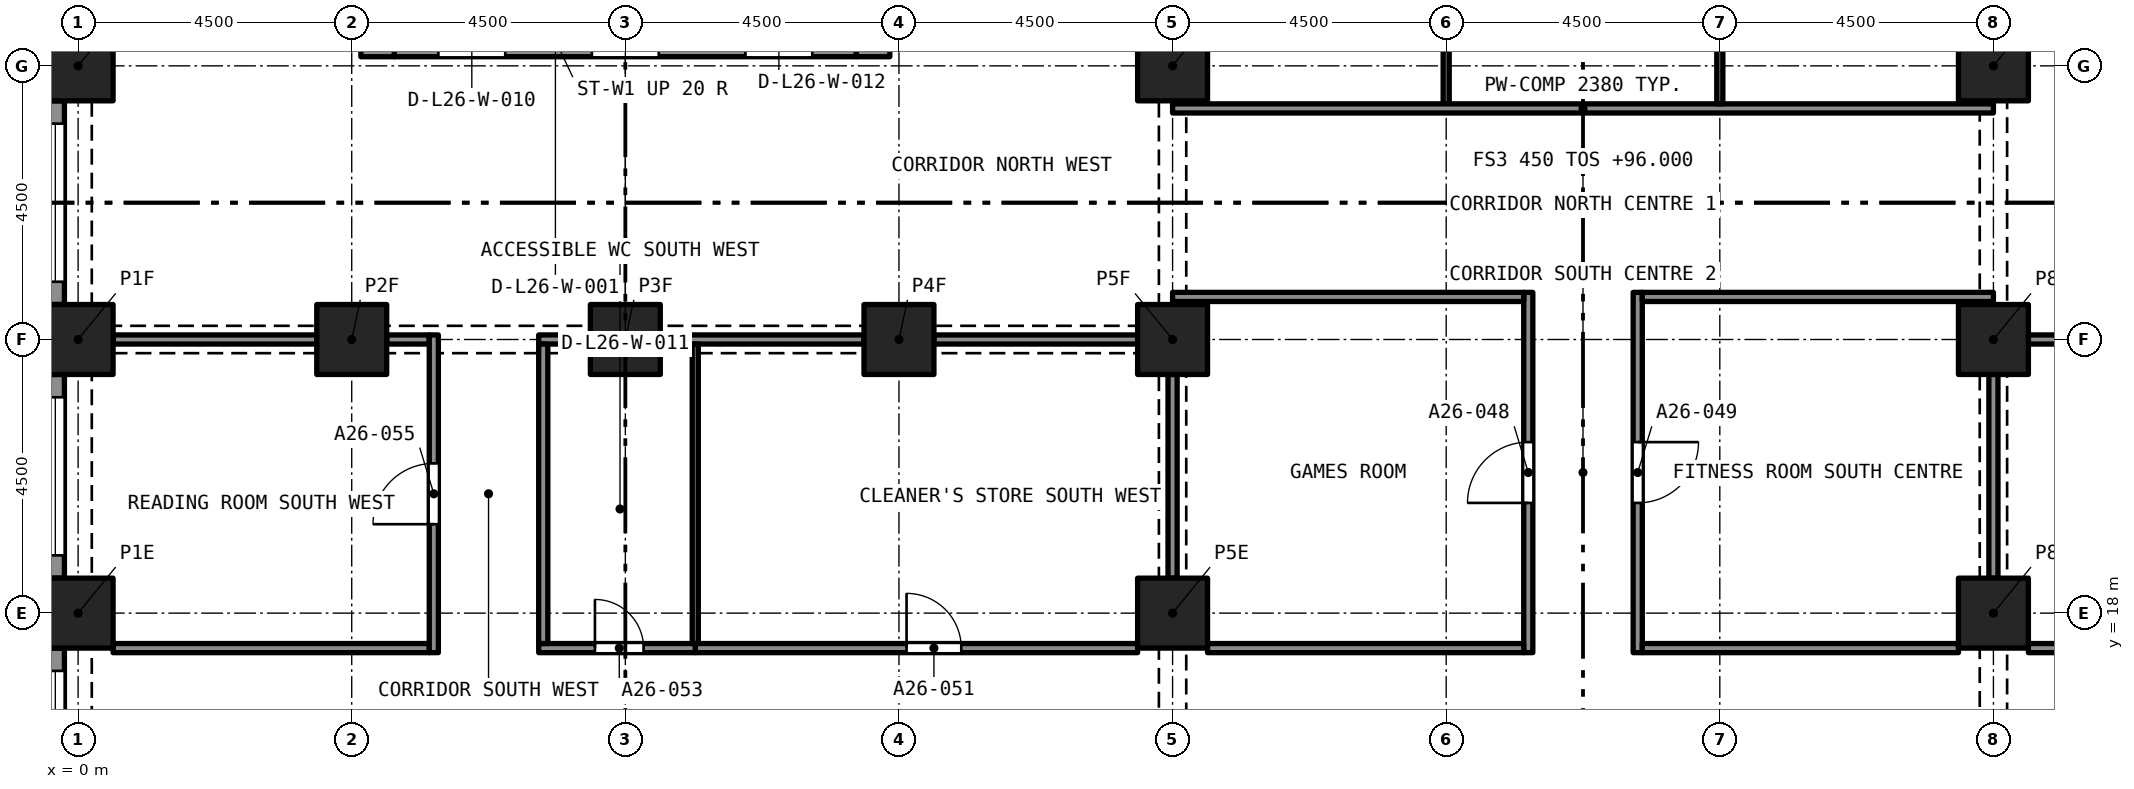
"""IFC4 building model, lengths in metres.
Left out: names, types, materials, properties, quantities, classifications, styles, units other than length and angle.
Written with IfcOpenShell. Run it as: python <this file> out.ifc"""

import sys

from ifc_helpers import new_model, si_unit, direction, frame, frame_2d, origin, origin_2d, place, context, subcontext, project, spatial, rectangle, extrude, element, fill, save


model = new_model("IFC4")
c1 = context("Model", 3, precision=1e-05, world=origin(), true_north=direction((0.0, 1.0)))
c2 = subcontext(c1, "Body", "Model", "MODEL_VIEW")
j1 = project(units=[si_unit("LENGTHUNIT", "METRE"), si_unit("PLANEANGLEUNIT", "RADIAN")], contexts=[c1])
p1 = place(None, origin())
s1 = spatial("IfcSite", under=j1, at=p1, CompositionType="ELEMENT")
p2 = place(p1, origin())
s2 = spatial("IfcBuilding", under=s1, at=p2, CompositionType="ELEMENT")
p3 = place(p2, frame((0.0, 0.0, 96.0)))
s3 = spatial("IfcBuildingStorey", under=s2, at=p3, CompositionType="ELEMENT", Elevation=96.0)
for number, where, z_axis, x_axis in (
    (1, (0.0, 18.0, 0.0), (0.0, 0.0, 1.0), (1.0, 0.0, 0.0)),
    (2, (18.0, 18.0, 0.0), (0.0, 0.0, 1.0), (1.0, 0.0, 0.0)),
    (3, (31.5, 18.0, 0.0), (0.0, 0.0, 1.0), (1.0, 0.0, 0.0)),
    (4, (0.0, 22.5, 0.0), (0.0, 0.0, 1.0), (1.0, 0.0, 0.0)),
    (5, (4.5, 22.5, 0.0), (0.0, 0.0, 1.0), (1.0, 0.0, 0.0)),
    (6, (9.0, 22.5, 0.0), (0.0, 0.0, 1.0), (1.0, 0.0, 0.0)),
    (7, (13.5, 22.5, 0.0), (0.0, 0.0, 1.0), (1.0, 0.0, 0.0)),
    (8, (18.0, 22.5, 0.0), (0.0, 0.0, 1.0), (1.0, 0.0, 0.0)),
    (9, (31.5, 22.5, 0.0), (0.0, 0.0, 1.0), (1.0, 0.0, 0.0)),
    (10, (0.0, 27.0, 0.0), (0.0, 0.0, 1.0), (1.0, 0.0, 0.0)),
    (11, (18.0, 27.0, 0.0), (0.0, 0.0, 1.0), (1.0, 0.0, 0.0)),
    (12, (31.5, 27.0, 0.0), (0.0, 0.0, 1.0), (1.0, 0.0, 0.0)),
):
    element("IfcColumn", number, at=place(p3, frame(where, z_axis=z_axis, x_axis=x_axis)), inside=s3, PredefinedType="COLUMN", context=c2, shape_type="SweptSolid", body=[
        extrude(rectangle(XDim=1.15, YDim=1.15, at=origin_2d()), origin(), (0.0, 0.0, 1.0), 3.2),
    ])
p4 = place(p3, frame((5.2, 27.425, 0.0), z_axis=(0.0, 0.0, 1.0), x_axis=(1.0, 0.0, 0.0)))
e13 = element("IfcWall", 13, at=p4, inside=s3, PredefinedType="SOLIDWALL", context=c2, shape_type="SweptSolid", body=[
    extrude(rectangle(XDim=7.6, YDim=0.55, at=frame_2d((3.8, 0.0))), origin(), (0.0, 0.0, 1.0), 3.2),
])
p5 = place(p4, frame((0.725, 0.0, 0.0)))
e14 = element("IfcOpeningElement", 14, at=p5, cuts=e13, PredefinedType="OPENING", context=c2, shape_type="SweptSolid", body=[
    extrude(rectangle(XDim=1.1, YDim=2.1, at=frame_2d((0.55, 1.05))), frame((0.0, 0.285, 0.0), z_axis=(0.0, -1.0, 0.0), x_axis=(1.0, 0.0, 0.0)), (0.0, 0.0, 1.0), 0.57),
])
p6 = place(p4, frame((3.25, 0.0, 0.0)))
e15 = element("IfcOpeningElement", 15, at=p6, cuts=e13, PredefinedType="OPENING", context=c2, shape_type="SweptSolid", body=[
    extrude(rectangle(XDim=1.1, YDim=2.1, at=frame_2d((0.55, 1.05))), frame((0.0, 0.285, 0.0), z_axis=(0.0, -1.0, 0.0), x_axis=(1.0, 0.0, 0.0)), (0.0, 0.0, 1.0), 0.57),
])
p7 = place(p4, frame((5.775, 0.0, 0.0)))
e16 = element("IfcOpeningElement", 16, at=p7, cuts=e13, PredefinedType="OPENING", context=c2, shape_type="SweptSolid", body=[
    extrude(rectangle(XDim=1.1, YDim=2.1, at=frame_2d((0.55, 1.05))), frame((0.0, 0.285, 0.0), z_axis=(0.0, -1.0, 0.0), x_axis=(1.0, 0.0, 0.0)), (0.0, 0.0, 1.0), 0.57),
])
p8 = place(p3, frame((4.925, 27.15, 0.0), z_axis=(0.0, 0.0, 1.0), x_axis=(0.0, 1.0, 0.0)))
e17 = element("IfcWall", 17, at=p8, inside=s3, PredefinedType="SOLIDWALL", context=c2, shape_type="SweptSolid", body=[
    extrude(rectangle(XDim=13.2, YDim=0.55, at=frame_2d((6.6, 0.0))), origin(), (0.0, 0.0, 1.0), 3.2),
])
p9 = place(p8, frame((8.8, 0.0, 0.0)))
e18 = element("IfcOpeningElement", 18, at=p9, cuts=e17, PredefinedType="OPENING", context=c2, shape_type="SweptSolid", body=[
    extrude(rectangle(XDim=1.2, YDim=2.1, at=frame_2d((0.6, 1.05))), frame((0.0, 0.285, 0.0), z_axis=(0.0, -1.0, 0.0), x_axis=(1.0, 0.0, 0.0)), (0.0, 0.0, 1.0), 0.57),
])
p10 = place(p3, frame((13.075, 27.15, 0.0), z_axis=(0.0, 0.0, 1.0), x_axis=(0.0, 1.0, 0.0)))
e19 = element("IfcWall", 19, at=p10, inside=s3, PredefinedType="SOLIDWALL", context=c2, shape_type="SweptSolid", body=[
    extrude(rectangle(XDim=13.2, YDim=0.55, at=frame_2d((6.6, 0.0))), origin(), (0.0, 0.0, 1.0), 3.2),
])
p11 = place(p10, frame((10.95, 0.0, 0.0)))
e20 = element("IfcOpeningElement", 20, at=p11, cuts=e19, PredefinedType="OPENING", context=c2, shape_type="SweptSolid", body=[
    extrude(rectangle(XDim=1.1, YDim=2.1, at=frame_2d((0.55, 1.05))), frame((0.0, 0.285, 0.0), z_axis=(0.0, -1.0, 0.0), x_axis=(1.0, 0.0, 0.0)), (0.0, 0.0, 1.0), 0.57),
])
p12 = place(p10, frame((8.8, 0.0, 0.0)))
e21 = element("IfcOpeningElement", 21, at=p12, cuts=e19, PredefinedType="OPENING", context=c2, shape_type="SweptSolid", body=[
    extrude(rectangle(XDim=1.2, YDim=2.1, at=frame_2d((0.6, 1.05))), frame((0.0, 0.285, 0.0), z_axis=(0.0, -1.0, 0.0), x_axis=(1.0, 0.0, 0.0)), (0.0, 0.0, 1.0), 0.57),
])
p13 = place(p3, frame((-0.375, 23.075, 0.0), z_axis=(0.0, 0.0, 1.0), x_axis=(0.0, 1.0, 0.0)))
e22 = element("IfcWall", 22, at=p13, inside=s3, PredefinedType="SOLIDWALL", context=c2, shape_type="SweptSolid", body=[
    extrude(rectangle(XDim=3.35, YDim=0.3, at=frame_2d((1.675, 0.0))), origin(), (0.0, 0.0, 1.0), 3.2),
])
p14 = place(p13, frame((0.375, 0.0, 0.45)))
e23 = element("IfcOpeningElement", 23, at=p14, cuts=e22, PredefinedType="OPENING", context=c2, shape_type="SweptSolid", body=[
    extrude(rectangle(XDim=2.6, YDim=1.95, at=frame_2d((1.3, 0.975))), frame((0.0, 0.16, 0.0), z_axis=(0.0, -1.0, 0.0), x_axis=(1.0, 0.0, 0.0)), (0.0, 0.0, 1.0), 0.32),
])
p15 = place(p3, frame((-0.375, 18.575, 0.0), z_axis=(0.0, 0.0, 1.0), x_axis=(0.0, 1.0, 0.0)))
e24 = element("IfcWall", 24, at=p15, inside=s3, PredefinedType="SOLIDWALL", context=c2, shape_type="SweptSolid", body=[
    extrude(rectangle(XDim=3.35, YDim=0.3, at=frame_2d((1.675, 0.0))), origin(), (0.0, 0.0, 1.0), 3.2),
])
p16 = place(p15, frame((0.375, 0.0, 0.45)))
e25 = element("IfcOpeningElement", 25, at=p16, cuts=e24, PredefinedType="OPENING", context=c2, shape_type="SweptSolid", body=[
    extrude(rectangle(XDim=2.6, YDim=1.95, at=frame_2d((1.3, 0.975))), frame((0.0, 0.16, 0.0), z_axis=(0.0, -1.0, 0.0), x_axis=(1.0, 0.0, 0.0)), (0.0, 0.0, 1.0), 0.32),
])
p17 = place(p3, frame((-0.375, 14.075, 0.0), z_axis=(0.0, 0.0, 1.0), x_axis=(0.0, 1.0, 0.0)))
e26 = element("IfcWall", 26, at=p17, inside=s3, PredefinedType="SOLIDWALL", context=c2, shape_type="SweptSolid", body=[
    extrude(rectangle(XDim=3.35, YDim=0.3, at=frame_2d((1.675, 0.0))), origin(), (0.0, 0.0, 1.0), 3.2),
])
p18 = place(p17, frame((0.375, 0.0, 0.45)))
e27 = element("IfcOpeningElement", 27, at=p18, cuts=e26, PredefinedType="OPENING", context=c2, shape_type="SweptSolid", body=[
    extrude(rectangle(XDim=2.6, YDim=1.95, at=frame_2d((1.3, 0.975))), frame((0.0, 0.16, 0.0), z_axis=(0.0, -1.0, 0.0), x_axis=(1.0, 0.0, 0.0)), (0.0, 0.0, 1.0), 0.32),
])
p19 = place(p3, frame((23.85, 17.35, 0.0), z_axis=(0.0, 0.0, 1.0), x_axis=(0.0, 1.0, 0.0)))
e28 = element("IfcWall", 28, at=p19, inside=s3, PredefinedType="PARTITIONING", context=c2, shape_type="SweptSolid", body=[
    extrude(rectangle(XDim=5.925, YDim=0.15, at=frame_2d((2.962, 0.0))), origin(), (0.0, 0.0, 1.0), 2.75),
])
p20 = place(p19, frame((2.462, 0.0, 0.0)))
e29 = element("IfcOpeningElement", 29, at=p20, cuts=e28, PredefinedType="OPENING", context=c2, shape_type="SweptSolid", body=[
    extrude(rectangle(XDim=1.0, YDim=2.1, at=frame_2d((0.5, 1.05))), frame((0.0, 0.085, 0.0), z_axis=(0.0, -1.0, 0.0), x_axis=(1.0, 0.0, 0.0)), (0.0, 0.0, 1.0), 0.17),
])
p21 = place(p3, frame((25.65, 23.275, 0.0), z_axis=(0.0, 0.0, 1.0), x_axis=(0.0, -1.0, 0.0)))
e30 = element("IfcWall", 30, at=p21, inside=s3, PredefinedType="PARTITIONING", context=c2, shape_type="SweptSolid", body=[
    extrude(rectangle(XDim=5.925, YDim=0.15, at=frame_2d((2.962, 0.0))), origin(), (0.0, 0.0, 1.0), 2.75),
])
p22 = place(p21, frame((2.462, 0.0, 0.0)))
e31 = element("IfcOpeningElement", 31, at=p22, cuts=e30, PredefinedType="OPENING", context=c2, shape_type="SweptSolid", body=[
    extrude(rectangle(XDim=1.0, YDim=2.1, at=frame_2d((0.5, 1.05))), frame((0.0, 0.085, 0.0), z_axis=(0.0, -1.0, 0.0), x_axis=(1.0, 0.0, 0.0)), (0.0, 0.0, 1.0), 0.17),
])
for number, where, z_axis, x_axis in (
    (32, (18.575, 17.425, 0.0), (0.0, 0.0, 1.0), (1.0, 0.0, 0.0)),
    (33, (25.725, 17.425, 0.0), (0.0, 0.0, 1.0), (1.0, 0.0, 0.0)),
):
    element("IfcWall", number, at=place(p3, frame(where, z_axis=z_axis, x_axis=x_axis)), inside=s3, PredefinedType="PARTITIONING", context=c2, shape_type="SweptSolid", body=[
        extrude(rectangle(XDim=5.2, YDim=0.15, at=frame_2d((2.6, 0.0))), origin(), (0.0, 0.0, 1.0), 2.75),
    ])
p23 = place(p3, frame((32.075, 17.425, 0.0), z_axis=(0.0, 0.0, 1.0), x_axis=(1.0, 0.0, 0.0)))
e34 = element("IfcWall", 34, at=p23, inside=s3, PredefinedType="PARTITIONING", context=c2, shape_type="SweptSolid", body=[
    extrude(rectangle(XDim=7.275, YDim=0.15, at=frame_2d((3.638, 0.0))), origin(), (0.0, 0.0, 1.0), 2.9),
])
p24 = place(p23, frame((2.9, 0.0, 0.0)))
e35 = element("IfcOpeningElement", 35, at=p24, cuts=e34, PredefinedType="OPENING", context=c2, shape_type="SweptSolid", body=[
    extrude(rectangle(XDim=0.9, YDim=2.1, at=frame_2d((0.45, 1.05))), frame((0.0, 0.085, 0.0), z_axis=(0.0, -1.0, 0.0), x_axis=(1.0, 0.0, 0.0)), (0.0, 0.0, 1.0), 0.17),
])
p25 = place(p3, frame((10.15, 17.425, 0.0), z_axis=(0.0, 0.0, 1.0), x_axis=(1.0, 0.0, 0.0)))
e36 = element("IfcWall", 36, at=p25, inside=s3, PredefinedType="PARTITIONING", context=c2, shape_type="SweptSolid", body=[
    extrude(rectangle(XDim=7.275, YDim=0.15, at=frame_2d((3.638, 0.0))), origin(), (0.0, 0.0, 1.0), 2.9),
])
p26 = place(p25, frame((3.475, 0.0, 0.0)))
e37 = element("IfcOpeningElement", 37, at=p26, cuts=e36, PredefinedType="OPENING", context=c2, shape_type="SweptSolid", body=[
    extrude(rectangle(XDim=0.9, YDim=2.1, at=frame_2d((0.45, 1.05))), frame((0.0, 0.085, 0.0), z_axis=(0.0, -1.0, 0.0), x_axis=(1.0, 0.0, 0.0)), (0.0, 0.0, 1.0), 0.17),
])
p27 = place(p3, frame((7.575, 17.425, 0.0), z_axis=(0.0, 0.0, 1.0), x_axis=(1.0, 0.0, 0.0)))
e38 = element("IfcWall", 38, at=p27, inside=s3, PredefinedType="PARTITIONING", context=c2, shape_type="SweptSolid", body=[
    extrude(rectangle(XDim=2.575, YDim=0.15, at=frame_2d((1.288, 0.0))), origin(), (0.0, 0.0, 1.0), 2.9),
])
p28 = place(p27, frame((0.925, 0.0, 0.0)))
e39 = element("IfcOpeningElement", 39, at=p28, cuts=e38, PredefinedType="OPENING", context=c2, shape_type="SweptSolid", body=[
    extrude(rectangle(XDim=0.8, YDim=2.1, at=frame_2d((0.4, 1.05))), frame((0.0, 0.085, 0.0), z_axis=(0.0, -1.0, 0.0), x_axis=(1.0, 0.0, 0.0)), (0.0, 0.0, 1.0), 0.17),
])
p29 = place(p3, frame((0.575, 17.425, 0.0), z_axis=(0.0, 0.0, 1.0), x_axis=(1.0, 0.0, 0.0)))
e40 = element("IfcWall", 40, at=p29, inside=s3, PredefinedType="PARTITIONING", context=c2, shape_type="SweptSolid", body=[
    extrude(rectangle(XDim=5.2, YDim=0.15, at=frame_2d((2.6, 0.0))), origin(), (0.0, 0.0, 1.0), 2.9),
])
p30 = place(p3, frame((22.5, 26.375, 0.0), z_axis=(0.0, 0.0, 1.0), x_axis=(0.0, 1.0, 0.0)))
e41 = element("IfcWall", 41, at=p30, inside=s3, PredefinedType="PARTITIONING", context=c2, shape_type="SweptSolid", body=[
    extrude(rectangle(XDim=10.125, YDim=0.1, at=frame_2d((5.062, 0.0))), origin(), (0.0, 0.0, 1.0), 2.75),
])
p31 = place(p3, frame((18.0, 26.3, 0.0), z_axis=(0.0, 0.0, 1.0), x_axis=(1.0, 0.0, 0.0)))
e42 = element("IfcWall", 42, at=p31, inside=s3, PredefinedType="PARTITIONING", context=c2, shape_type="SweptSolid", body=[
    extrude(rectangle(XDim=13.5, YDim=0.15, at=frame_2d((6.75, 0.0))), origin(), (0.0, 0.0, 1.0), 2.38),
])
p32 = place(p3, frame((27.0, 26.375, 0.0), z_axis=(0.0, 0.0, 1.0), x_axis=(0.0, 1.0, 0.0)))
e43 = element("IfcWall", 43, at=p32, inside=s3, PredefinedType="PARTITIONING", context=c2, shape_type="SweptSolid", body=[
    extrude(rectangle(XDim=10.125, YDim=0.1, at=frame_2d((5.062, 0.0))), origin(), (0.0, 0.0, 1.0), 2.75),
])
p33 = place(p3, frame((18.0, 23.2, 0.0), z_axis=(0.0, 0.0, 1.0), x_axis=(1.0, 0.0, 0.0)))
e44 = element("IfcWall", 44, at=p33, inside=s3, PredefinedType="PARTITIONING", context=c2, shape_type="SweptSolid", body=[
    extrude(rectangle(XDim=5.775, YDim=0.15, at=frame_2d((2.887, 0.0))), origin(), (0.0, 0.0, 1.0), 2.75),
])
p34 = place(p3, frame((18.0, 18.575, 0.0), z_axis=(0.0, 0.0, 1.0), x_axis=(0.0, 1.0, 0.0)))
e45 = element("IfcWall", 45, at=p34, inside=s3, PredefinedType="PARTITIONING", context=c2, shape_type="SweptSolid", body=[
    extrude(rectangle(XDim=3.35, YDim=0.15, at=frame_2d((1.675, 0.0))), origin(), (0.0, 0.0, 1.0), 2.38),
])
p35 = place(p3, frame((25.725, 23.2, 0.0), z_axis=(0.0, 0.0, 1.0), x_axis=(1.0, 0.0, 0.0)))
e46 = element("IfcWall", 46, at=p35, inside=s3, PredefinedType="PARTITIONING", context=c2, shape_type="SweptSolid", body=[
    extrude(rectangle(XDim=5.775, YDim=0.15, at=frame_2d((2.887, 0.0))), origin(), (0.0, 0.0, 1.0), 2.75),
])
p36 = place(p3, frame((31.5, 18.575, 0.0), z_axis=(0.0, 0.0, 1.0), x_axis=(0.0, 1.0, 0.0)))
e47 = element("IfcWall", 47, at=p36, inside=s3, PredefinedType="PARTITIONING", context=c2, shape_type="SweptSolid", body=[
    extrude(rectangle(XDim=3.35, YDim=0.15, at=frame_2d((1.675, 0.0))), origin(), (0.0, 0.0, 1.0), 2.38),
])
p37 = place(p3, frame((32.075, 22.5, 0.0), z_axis=(0.0, 0.0, 1.0), x_axis=(1.0, 0.0, 0.0)))
e48 = element("IfcWall", 48, at=p37, inside=s3, PredefinedType="PARTITIONING", context=c2, shape_type="SweptSolid", body=[
    extrude(rectangle(XDim=9.85, YDim=0.15, at=frame_2d((4.925, 0.0))), origin(), (0.0, 0.0, 1.0), 2.9),
])
for number, where, z_axis, x_axis in (
    (49, (14.075, 22.5, 0.0), (0.0, 0.0, 1.0), (1.0, 0.0, 0.0)),
    (50, (9.575, 22.5, 0.0), (0.0, 0.0, 1.0), (1.0, 0.0, 0.0)),
):
    element("IfcWall", number, at=place(p3, frame(where, z_axis=z_axis, x_axis=x_axis)), inside=s3, PredefinedType="PARTITIONING", context=c2, shape_type="SweptSolid", body=[
        extrude(rectangle(XDim=3.35, YDim=0.15, at=frame_2d((1.675, 0.0))), origin(), (0.0, 0.0, 1.0), 2.38),
    ])
p38 = place(p3, frame((7.575, 22.5, 0.0), z_axis=(0.0, 0.0, 1.0), x_axis=(1.0, 0.0, 0.0)))
e51 = element("IfcWall", 51, at=p38, inside=s3, PredefinedType="PARTITIONING", context=c2, shape_type="SweptSolid", body=[
    extrude(rectangle(XDim=0.85, YDim=0.15, at=frame_2d((0.425, 0.0))), origin(), (0.0, 0.0, 1.0), 2.38),
])
p39 = place(p3, frame((5.075, 22.5, 0.0), z_axis=(0.0, 0.0, 1.0), x_axis=(1.0, 0.0, 0.0)))
e52 = element("IfcWall", 52, at=p39, inside=s3, PredefinedType="PARTITIONING", context=c2, shape_type="SweptSolid", body=[
    extrude(rectangle(XDim=0.7, YDim=0.15, at=frame_2d((0.35, 0.0))), origin(), (0.0, 0.0, 1.0), 2.38),
])
p40 = place(p3, frame((0.575, 22.5, 0.0), z_axis=(0.0, 0.0, 1.0), x_axis=(1.0, 0.0, 0.0)))
e53 = element("IfcWall", 53, at=p40, inside=s3, PredefinedType="PARTITIONING", context=c2, shape_type="SweptSolid", body=[
    extrude(rectangle(XDim=3.35, YDim=0.15, at=frame_2d((1.675, 0.0))), origin(), (0.0, 0.0, 1.0), 2.38),
])
p41 = place(p3, frame((7.65, 17.5, 0.0), z_axis=(0.0, 0.0, 1.0), x_axis=(0.0, 1.0, 0.0)))
e54 = element("IfcWall", 54, at=p41, inside=s3, PredefinedType="PARTITIONING", context=c2, shape_type="SweptSolid", body=[
    extrude(rectangle(XDim=4.925, YDim=0.15, at=frame_2d((2.462, 0.0))), origin(), (0.0, 0.0, 1.0), 2.9),
])
p42 = place(p3, frame((5.85, 17.35, 0.0), z_axis=(0.0, 0.0, 1.0), x_axis=(0.0, 1.0, 0.0)))
e55 = element("IfcWall", 55, at=p42, inside=s3, PredefinedType="PARTITIONING", context=c2, shape_type="SweptSolid", body=[
    extrude(rectangle(XDim=5.225, YDim=0.15, at=frame_2d((2.612, 0.0))), origin(), (0.0, 0.0, 1.0), 2.9),
])
p43 = place(p42, frame((2.113, 0.0, 0.0)))
e56 = element("IfcOpeningElement", 56, at=p43, cuts=e55, PredefinedType="OPENING", context=c2, shape_type="SweptSolid", body=[
    extrude(rectangle(XDim=1.0, YDim=2.1, at=frame_2d((0.5, 1.05))), frame((0.0, 0.085, 0.0), z_axis=(0.0, -1.0, 0.0), x_axis=(1.0, 0.0, 0.0)), (0.0, 0.0, 1.0), 0.17),
])
p44 = place(p3, frame((10.15, 17.5, 0.0), z_axis=(0.0, 0.0, 1.0), x_axis=(0.0, 1.0, 0.0)))
e57 = element("IfcWall", 57, at=p44, inside=s3, PredefinedType="PARTITIONING", context=c2, shape_type="SweptSolid", body=[
    extrude(rectangle(XDim=4.925, YDim=0.1, at=frame_2d((2.462, 0.0))), origin(), (0.0, 0.0, 1.0), 2.9),
])
p45 = place(p14, origin())
e58 = element("IfcWindow", 58, at=p45, inside=s3, PartitioningType="SINGLE_PANEL", PredefinedType="WINDOW", context=c2, shape_type="SweptSolid", body=[
    extrude(rectangle(XDim=2.6, YDim=1.95, at=frame_2d((1.3, 0.975))), frame((0.0, 0.03, 0.0), z_axis=(0.0, -1.0, 0.0), x_axis=(1.0, 0.0, 0.0)), (0.0, 0.0, 1.0), 0.06),
])
fill(e23, e58)
p46 = place(p16, origin())
e59 = element("IfcWindow", 59, at=p46, inside=s3, PartitioningType="SINGLE_PANEL", PredefinedType="WINDOW", context=c2, shape_type="SweptSolid", body=[
    extrude(rectangle(XDim=2.6, YDim=1.95, at=frame_2d((1.3, 0.975))), frame((0.0, 0.03, 0.0), z_axis=(0.0, -1.0, 0.0), x_axis=(1.0, 0.0, 0.0)), (0.0, 0.0, 1.0), 0.06),
])
fill(e25, e59)
p47 = place(p18, origin())
e60 = element("IfcWindow", 60, at=p47, inside=s3, PartitioningType="SINGLE_PANEL", PredefinedType="WINDOW", context=c2, shape_type="SweptSolid", body=[
    extrude(rectangle(XDim=2.6, YDim=1.95, at=frame_2d((1.3, 0.975))), frame((0.0, 0.03, 0.0), z_axis=(0.0, -1.0, 0.0), x_axis=(1.0, 0.0, 0.0)), (0.0, 0.0, 1.0), 0.06),
])
fill(e27, e60)
p48 = place(p20, origin())
e61 = element("IfcDoor", 61, at=p48, inside=s3, OperationType="SINGLE_SWING_RIGHT", PredefinedType="DOOR", context=c2, shape_type="SweptSolid", body=[
    extrude(rectangle(XDim=1.0, YDim=2.1, at=frame_2d((0.5, 1.05))), frame((0.0, 0.025, 0.0), z_axis=(0.0, -1.0, 0.0), x_axis=(1.0, 0.0, 0.0)), (0.0, 0.0, 1.0), 0.05),
])
fill(e29, e61)
p49 = place(p22, origin())
e62 = element("IfcDoor", 62, at=p49, inside=s3, OperationType="SINGLE_SWING_RIGHT", PredefinedType="DOOR", context=c2, shape_type="SweptSolid", body=[
    extrude(rectangle(XDim=1.0, YDim=2.1, at=frame_2d((0.5, 1.05))), frame((0.0, 0.025, 0.0), z_axis=(0.0, -1.0, 0.0), x_axis=(1.0, 0.0, 0.0)), (0.0, 0.0, 1.0), 0.05),
])
fill(e31, e62)
p50 = place(p26, origin())
e63 = element("IfcDoor", 63, at=p50, inside=s3, OperationType="SINGLE_SWING_RIGHT", PredefinedType="DOOR", context=c2, shape_type="SweptSolid", body=[
    extrude(rectangle(XDim=0.9, YDim=2.1, at=frame_2d((0.45, 1.05))), frame((0.0, 0.025, 0.0), z_axis=(0.0, -1.0, 0.0), x_axis=(1.0, 0.0, 0.0)), (0.0, 0.0, 1.0), 0.05),
])
fill(e37, e63)
p51 = place(p28, origin())
e64 = element("IfcDoor", 64, at=p51, inside=s3, OperationType="SINGLE_SWING_RIGHT", PredefinedType="DOOR", context=c2, shape_type="SweptSolid", body=[
    extrude(rectangle(XDim=0.8, YDim=2.1, at=frame_2d((0.4, 1.05))), frame((0.0, 0.025, 0.0), z_axis=(0.0, -1.0, 0.0), x_axis=(1.0, 0.0, 0.0)), (0.0, 0.0, 1.0), 0.05),
])
fill(e39, e64)
p52 = place(p43, origin())
e65 = element("IfcDoor", 65, at=p52, inside=s3, OperationType="SINGLE_SWING_LEFT", PredefinedType="DOOR", context=c2, shape_type="SweptSolid", body=[
    extrude(rectangle(XDim=1.0, YDim=2.1, at=frame_2d((0.5, 1.05))), frame((0.0, 0.025, 0.0), z_axis=(0.0, -1.0, 0.0), x_axis=(1.0, 0.0, 0.0)), (0.0, 0.0, 1.0), 0.05),
])
fill(e56, e65)
save(model, sys.argv[1])
